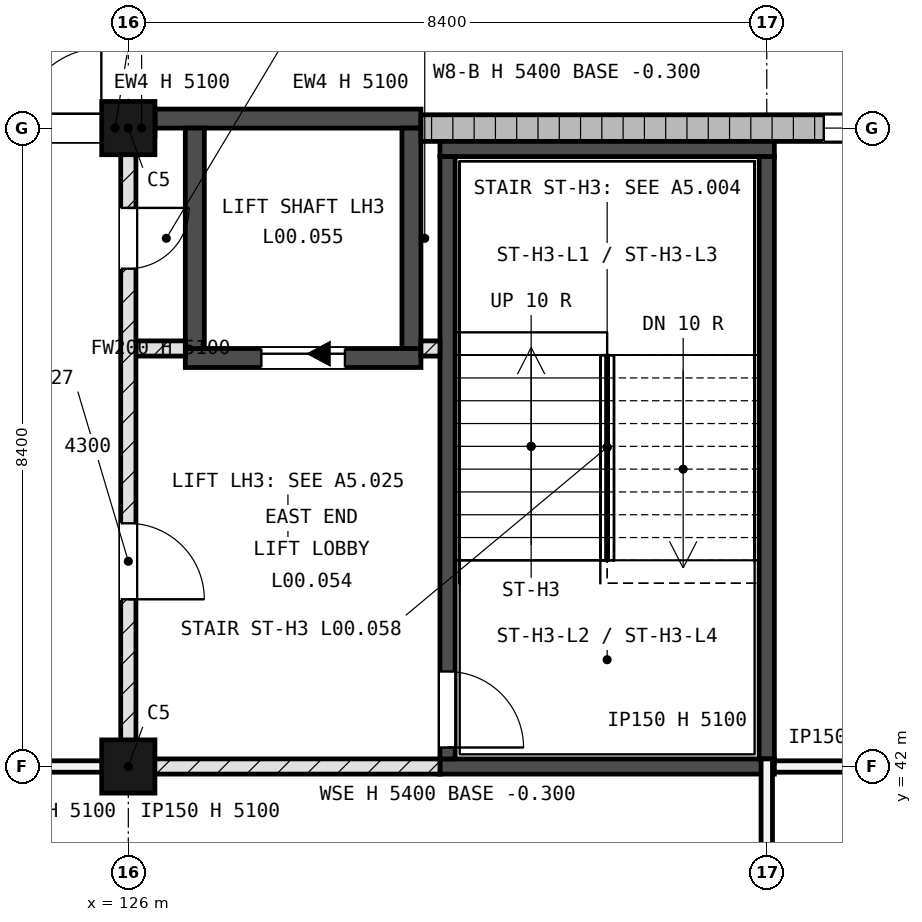
"""IFC4 building model, lengths in metres.
Left out: names, types, materials, properties, quantities, classifications, styles, units other than length and angle.
Written with IfcOpenShell. Run it as: python <this file> out.ifc"""

import sys

from ifc_helpers import new_model, si_unit, direction, frame, frame_2d, origin, origin_2d, place, context, subcontext, project, spatial, rectangle, extrude, element, fill, save


model = new_model("IFC4")
c1 = context("Model", 3, precision=1e-05, world=origin(), true_north=direction((0.0, 1.0)))
c2 = subcontext(c1, "Body", "Model", "MODEL_VIEW")
j1 = project(units=[si_unit("LENGTHUNIT", "METRE"), si_unit("PLANEANGLEUNIT", "RADIAN")], contexts=[c1])
p1 = place(None, origin())
s1 = spatial("IfcSite", under=j1, at=p1, CompositionType="ELEMENT")
p2 = place(p1, origin())
s2 = spatial("IfcBuilding", under=s1, at=p2, CompositionType="ELEMENT")
p3 = place(p2, origin())
s3 = spatial("IfcBuildingStorey", under=s2, at=p3, CompositionType="ELEMENT", Elevation=0.0)
for number, where, z_axis, x_axis in (
    (1, (126.0, 42.0, -0.3), (0.0, 0.0, 1.0), (1.0, 0.0, 0.0)),
    (2, (126.0, 50.4, -0.3), (0.0, 0.0, 1.0), (1.0, 0.0, 0.0)),
):
    element("IfcColumn", number, at=place(p3, frame(where, z_axis=z_axis, x_axis=x_axis)), inside=s3, PredefinedType="COLUMN", context=c2, shape_type="SweptSolid", body=[
        extrude(rectangle(XDim=0.7, YDim=0.7, at=origin_2d()), origin(), (0.0, 0.0, 1.0), 5.4),
    ])
p4 = place(p3, frame((126.75, 47.375, -0.3), z_axis=(0.0, 0.0, 1.0), x_axis=(1.0, 0.0, 0.0)))
e3 = element("IfcWall", 3, at=p4, inside=s3, PredefinedType="SHEAR", context=c2, shape_type="SweptSolid", body=[
    extrude(rectangle(XDim=3.1, YDim=0.25, at=frame_2d((1.55, 0.0))), origin(), (0.0, 0.0, 1.0), 5.4),
])
p5 = place(p4, frame((1.0, 0.0, 0.3)))
e4 = element("IfcOpeningElement", 4, at=p5, cuts=e3, PredefinedType="OPENING", context=c2, shape_type="SweptSolid", body=[
    extrude(rectangle(XDim=1.1, YDim=2.1, at=frame_2d((0.55, 1.05))), frame((0.0, 0.135, 0.0), z_axis=(0.0, -1.0, 0.0), x_axis=(1.0, 0.0, 0.0)), (0.0, 0.0, 1.0), 0.27),
])
p6 = place(p3, frame((126.35, 50.525, -0.3), z_axis=(0.0, 0.0, 1.0), x_axis=(1.0, 0.0, 0.0)))
e5 = element("IfcWall", 5, at=p6, inside=s3, PredefinedType="SHEAR", context=c2, shape_type="SweptSolid", body=[
    extrude(rectangle(XDim=3.5, YDim=0.25, at=frame_2d((1.75, 0.0))), origin(), (0.0, 0.0, 1.0), 5.4),
])
for number, where, z_axis, x_axis in (
    (6, (126.875, 47.5, -0.3), (0.0, 0.0, 1.0), (0.0, 1.0, 0.0)),
    (7, (129.725, 47.5, -0.3), (0.0, 0.0, 1.0), (0.0, 1.0, 0.0)),
):
    element("IfcWall", number, at=place(p3, frame(where, z_axis=z_axis, x_axis=x_axis)), inside=s3, PredefinedType="SHEAR", context=c2, shape_type="SweptSolid", body=[
        extrude(rectangle(XDim=2.9, YDim=0.25, at=frame_2d((1.45, 0.0))), origin(), (0.0, 0.0, 1.0), 5.4),
    ])
p7 = place(p3, frame((109.575, 50.4, 0.0), z_axis=(0.0, 0.0, 1.0), x_axis=(1.0, 0.0, 0.0)))
e8 = element("IfcWall", 8, at=p7, inside=s3, PredefinedType="STANDARD", context=c2, shape_type="SweptSolid", body=[
    extrude(rectangle(XDim=16.075, YDim=0.35, at=frame_2d((8.038, 0.0))), origin(), (0.0, 0.0, 1.0), 5.1),
])
p8 = place(p7, frame((8.375, 0.0, 0.0)))
e9 = element("IfcOpeningElement", 9, at=p8, cuts=e8, PredefinedType="OPENING", context=c2, shape_type="SweptSolid", body=[
    extrude(rectangle(XDim=2.1, YDim=2.2, at=frame_2d((1.05, 1.1))), frame((0.0, 0.185, 0.0), z_axis=(0.0, -1.0, 0.0), x_axis=(1.0, 0.0, 0.0)), (0.0, 0.0, 1.0), 0.37),
])
p9 = place(p7, frame((11.175, 0.0, 0.0)))
e10 = element("IfcOpeningElement", 10, at=p9, cuts=e8, PredefinedType="OPENING", context=c2, shape_type="SweptSolid", body=[
    extrude(rectangle(XDim=2.1, YDim=2.2, at=frame_2d((1.05, 1.1))), frame((0.0, 0.185, 0.0), z_axis=(0.0, -1.0, 0.0), x_axis=(1.0, 0.0, 0.0)), (0.0, 0.0, 1.0), 0.37),
])
p10 = place(p7, frame((13.97, 0.0, 0.0)))
e11 = element("IfcOpeningElement", 11, at=p10, cuts=e8, PredefinedType="OPENING", context=c2, shape_type="SweptSolid", body=[
    extrude(rectangle(XDim=2.1, YDim=2.2, at=frame_2d((1.05, 1.1))), frame((0.0, 0.185, 0.0), z_axis=(0.0, -1.0, 0.0), x_axis=(1.0, 0.0, 0.0)), (0.0, 0.0, 1.0), 0.37),
])
p11 = place(p7, frame((0.712, 0.0, 0.9)))
e12 = element("IfcOpeningElement", 12, at=p11, cuts=e8, PredefinedType="OPENING", context=c2, shape_type="SweptSolid", body=[
    extrude(rectangle(XDim=2.4, YDim=1.5, at=frame_2d((1.2, 0.75))), frame((0.0, 0.185, 0.0), z_axis=(0.0, -1.0, 0.0), x_axis=(1.0, 0.0, 0.0)), (0.0, 0.0, 1.0), 0.37),
])
p12 = place(p3, frame((129.85, 50.4, 0.0), z_axis=(0.0, 0.0, 1.0), x_axis=(1.0, 0.0, 0.0)))
e13 = element("IfcWall", 13, at=p12, inside=s3, PredefinedType="STANDARD", context=c2, shape_type="SweptSolid", body=[
    extrude(rectangle(XDim=12.6, YDim=0.35, at=frame_2d((6.3, 0.0))), origin(), (0.0, 0.0, 1.0), 5.1),
])
p13 = place(p12, frame((7.7, 0.0, 0.0)))
e14 = element("IfcOpeningElement", 14, at=p13, cuts=e13, PredefinedType="OPENING", context=c2, shape_type="SweptSolid", body=[
    extrude(rectangle(XDim=2.1, YDim=2.2, at=frame_2d((1.05, 1.1))), frame((0.0, 0.185, 0.0), z_axis=(0.0, -1.0, 0.0), x_axis=(1.0, 0.0, 0.0)), (0.0, 0.0, 1.0), 0.37),
])
p14 = place(p12, frame((5.3, 0.0, 0.6)))
e15 = element("IfcOpeningElement", 15, at=p14, cuts=e13, PredefinedType="OPENING", context=c2, shape_type="SweptSolid", body=[
    extrude(rectangle(XDim=1.2, YDim=1.8, at=frame_2d((0.6, 0.9))), frame((0.0, 0.185, 0.0), z_axis=(0.0, -1.0, 0.0), x_axis=(1.0, 0.0, 0.0)), (0.0, 0.0, 1.0), 0.37),
])
p15 = place(p12, frame((10.825, 0.0, 0.6)))
e16 = element("IfcOpeningElement", 16, at=p15, cuts=e13, PredefinedType="OPENING", context=c2, shape_type="SweptSolid", body=[
    extrude(rectangle(XDim=1.2, YDim=1.8, at=frame_2d((0.6, 0.9))), frame((0.0, 0.185, 0.0), z_axis=(0.0, -1.0, 0.0), x_axis=(1.0, 0.0, 0.0)), (0.0, 0.0, 1.0), 0.37),
])
for number, where, z_axis, x_axis in (
    (17, (130.1, 42.0, -0.3), (0.0, 0.0, 1.0), (1.0, 0.0, 0.0)),
    (18, (130.1, 50.125, -0.3), (0.0, 0.0, 1.0), (1.0, 0.0, 0.0)),
):
    element("IfcWall", number, at=place(p3, frame(where, z_axis=z_axis, x_axis=x_axis)), inside=s3, PredefinedType="SHEAR", context=c2, shape_type="SweptSolid", body=[
        extrude(rectangle(XDim=4.4, YDim=0.2, at=frame_2d((2.2, 0.0))), origin(), (0.0, 0.0, 1.0), 5.4),
    ])
p16 = place(p3, frame((130.2, 42.1, -0.3), z_axis=(0.0, 0.0, 1.0), x_axis=(0.0, 1.0, 0.0)))
e19 = element("IfcWall", 19, at=p16, inside=s3, PredefinedType="SHEAR", context=c2, shape_type="SweptSolid", body=[
    extrude(rectangle(XDim=7.925, YDim=0.2, at=frame_2d((3.962, 0.0))), origin(), (0.0, 0.0, 1.0), 5.4),
])
p17 = place(p16, frame((0.15, 0.0, 0.3)))
e20 = element("IfcOpeningElement", 20, at=p17, cuts=e19, PredefinedType="OPENING", context=c2, shape_type="SweptSolid", body=[
    extrude(rectangle(XDim=1.0, YDim=2.1, at=frame_2d((0.5, 1.05))), frame((0.0, 0.11, 0.0), z_axis=(0.0, -1.0, 0.0), x_axis=(1.0, 0.0, 0.0)), (0.0, 0.0, 1.0), 0.22),
])
p18 = place(p3, frame((134.4, 42.1, -0.3), z_axis=(0.0, 0.0, 1.0), x_axis=(0.0, 1.0, 0.0)))
e21 = element("IfcWall", 21, at=p18, inside=s3, PredefinedType="SHEAR", context=c2, shape_type="SweptSolid", body=[
    extrude(rectangle(XDim=7.925, YDim=0.2, at=frame_2d((3.962, 0.0))), origin(), (0.0, 0.0, 1.0), 5.4),
])
p19 = place(p3, frame((117.7, 42.0, 0.0), z_axis=(0.0, 0.0, 1.0), x_axis=(1.0, 0.0, 0.0)))
e22 = element("IfcWall", 22, at=p19, inside=s3, PredefinedType="PARTITIONING", context=c2, shape_type="SweptSolid", body=[
    extrude(rectangle(XDim=8.3, YDim=0.15, at=frame_2d((4.15, 0.0))), origin(), (0.0, 0.0, 1.0), 5.1),
])
p20 = place(p19, frame((3.05, 0.0, 0.0)))
e23 = element("IfcOpeningElement", 23, at=p20, cuts=e22, PredefinedType="OPENING", context=c2, shape_type="SweptSolid", body=[
    extrude(rectangle(XDim=2.1, YDim=2.1, at=frame_2d((1.05, 1.05))), frame((0.0, 0.085, 0.0), z_axis=(0.0, -1.0, 0.0), x_axis=(1.0, 0.0, 0.0)), (0.0, 0.0, 1.0), 0.17),
])
p21 = place(p3, frame((126.0, 42.0, 0.0), z_axis=(0.0, 0.0, 1.0), x_axis=(1.0, 0.0, 0.0)))
e24 = element("IfcWall", 24, at=p21, inside=s3, PredefinedType="SOLIDWALL", context=c2, shape_type="SweptSolid", body=[
    extrude(rectangle(XDim=4.1, YDim=0.2, at=frame_2d((2.05, 0.0))), origin(), (0.0, 0.0, 1.0), 5.1),
])
p22 = place(p3, frame((134.5, 42.0, 0.0), z_axis=(0.0, 0.0, 1.0), x_axis=(1.0, 0.0, 0.0)))
e25 = element("IfcWall", 25, at=p22, inside=s3, PredefinedType="PARTITIONING", context=c2, shape_type="SweptSolid", body=[
    extrude(rectangle(XDim=8.63, YDim=0.15, at=frame_2d((4.315, 0.0))), origin(), (0.0, 0.0, 1.0), 5.1),
])
p23 = place(p22, frame((3.65, 0.0, 0.0)))
e26 = element("IfcOpeningElement", 26, at=p23, cuts=e25, PredefinedType="OPENING", context=c2, shape_type="SweptSolid", body=[
    extrude(rectangle(XDim=0.9, YDim=2.25, at=frame_2d((0.45, 1.125))), frame((0.0, 0.085, 0.0), z_axis=(0.0, -1.0, 0.0), x_axis=(1.0, 0.0, 0.0)), (0.0, 0.0, 1.0), 0.17),
])
p24 = place(p3, frame((126.1, 47.5, 0.0), z_axis=(0.0, 0.0, 1.0), x_axis=(1.0, 0.0, 0.0)))
e27 = element("IfcWall", 27, at=p24, inside=s3, PredefinedType="SOLIDWALL", context=c2, shape_type="SweptSolid", body=[
    extrude(rectangle(XDim=0.65, YDim=0.2, at=frame_2d((0.325, 0.0))), origin(), (0.0, 0.0, 1.0), 5.1),
])
p25 = place(p3, frame((129.85, 47.5, 0.0), z_axis=(0.0, 0.0, 1.0), x_axis=(1.0, 0.0, 0.0)))
e28 = element("IfcWall", 28, at=p25, inside=s3, PredefinedType="SOLIDWALL", context=c2, shape_type="SweptSolid", body=[
    extrude(rectangle(XDim=0.25, YDim=0.2, at=frame_2d((0.125, 0.0))), origin(), (0.0, 0.0, 1.0), 5.1),
])
p26 = place(p3, frame((125.65, 50.4, 0.0), z_axis=(0.0, 0.0, 1.0), x_axis=(1.0, 0.0, 0.0)))
e29 = element("IfcWall", 29, at=p26, inside=s3, PredefinedType="PARTITIONING", context=c2, shape_type="SweptSolid", body=[
    extrude(rectangle(XDim=0.35, YDim=0.15, at=frame_2d((0.175, 0.0))), origin(), (0.0, 0.0, 1.0), 5.1),
])
p27 = place(p3, frame((126.0, 50.4, 0.0), z_axis=(0.0, 0.0, 1.0), x_axis=(1.0, 0.0, 0.0)))
e30 = element("IfcWall", 30, at=p27, inside=s3, PredefinedType="SOLIDWALL", context=c2, shape_type="SweptSolid", body=[
    extrude(rectangle(XDim=0.35, YDim=0.2, at=frame_2d((0.175, 0.0))), origin(), (0.0, 0.0, 1.0), 5.1),
])
p28 = place(p3, frame((126.0, 42.1, 0.0), z_axis=(0.0, 0.0, 1.0), x_axis=(0.0, 1.0, 0.0)))
e31 = element("IfcWall", 31, at=p28, inside=s3, PredefinedType="SOLIDWALL", context=c2, shape_type="SweptSolid", body=[
    extrude(rectangle(XDim=8.2, YDim=0.2, at=frame_2d((4.1, 0.0))), origin(), (0.0, 0.0, 1.0), 4.3),
])
p29 = place(p28, frame((6.45, 0.0, 0.0)))
e32 = element("IfcOpeningElement", 32, at=p29, cuts=e31, PredefinedType="OPENING", context=c2, shape_type="SweptSolid", body=[
    extrude(rectangle(XDim=0.8, YDim=2.1, at=frame_2d((0.4, 1.05))), frame((0.0, 0.11, 0.0), z_axis=(0.0, -1.0, 0.0), x_axis=(1.0, 0.0, 0.0)), (0.0, 0.0, 1.0), 0.22),
])
p30 = place(p28, frame((2.1, 0.0, 0.0)))
e33 = element("IfcOpeningElement", 33, at=p30, cuts=e31, PredefinedType="OPENING", context=c2, shape_type="SweptSolid", body=[
    extrude(rectangle(XDim=1.0, YDim=2.1, at=frame_2d((0.5, 1.05))), frame((0.0, 0.11, 0.0), z_axis=(0.0, -1.0, 0.0), x_axis=(1.0, 0.0, 0.0)), (0.0, 0.0, 1.0), 0.22),
])
p31 = place(p3, frame((134.4, 33.27, 0.0), z_axis=(0.0, 0.0, 1.0), x_axis=(0.0, 1.0, 0.0)))
e34 = element("IfcWall", 34, at=p31, inside=s3, PredefinedType="PARTITIONING", context=c2, shape_type="SweptSolid", body=[
    extrude(rectangle(XDim=8.83, YDim=0.15, at=frame_2d((4.415, 0.0))), origin(), (0.0, 0.0, 1.0), 5.1),
])
p32 = place(p10, origin())
e35 = element("IfcDoor", 35, at=p32, inside=s3, OperationType="SINGLE_SWING_LEFT", PredefinedType="DOOR", context=c2, shape_type="SweptSolid", body=[
    extrude(rectangle(XDim=2.1, YDim=0.013, at=frame_2d((1.05, 0.007))), frame((0.0, 0.115, 0.0), z_axis=(0.0, -1.0, 0.0), x_axis=(1.0, 0.0, 0.0)), (0.0, 0.0, 1.0), 0.23),
    extrude(rectangle(XDim=0.075, YDim=2.112, at=frame_2d((0.038, 1.069))), frame((0.0, 0.125, 0.0), z_axis=(0.0, -1.0, 0.0), x_axis=(1.0, 0.0, 0.0)), (0.0, 0.0, 1.0), 0.25),
    extrude(rectangle(XDim=0.075, YDim=2.112, at=frame_2d((2.062, 1.069))), frame((0.0, 0.125, 0.0), z_axis=(0.0, -1.0, 0.0), x_axis=(1.0, 0.0, 0.0)), (0.0, 0.0, 1.0), 0.25),
    extrude(rectangle(XDim=2.1, YDim=0.075, at=frame_2d((1.05, 2.163))), frame((0.0, 0.115, 0.0), z_axis=(0.0, -1.0, 0.0), x_axis=(1.0, 0.0, 0.0)), (0.0, 0.0, 1.0), 0.23),
    extrude(rectangle(XDim=1.95, YDim=0.3, at=frame_2d((1.05, 0.163))), frame((0.0, 0.02, 0.0), z_axis=(0.0, -1.0, 0.0), x_axis=(1.0, 0.0, 0.0)), (0.0, 0.0, 1.0), 0.04),
    extrude(rectangle(XDim=1.95, YDim=0.12, at=frame_2d((1.05, 2.065))), frame((0.0, 0.02, 0.0), z_axis=(0.0, -1.0, 0.0), x_axis=(1.0, 0.0, 0.0)), (0.0, 0.0, 1.0), 0.04),
    extrude(rectangle(XDim=0.09, YDim=1.692, at=frame_2d((0.12, 1.159))), frame((0.0, 0.025, 0.0), z_axis=(0.0, -1.0, 0.0), x_axis=(1.0, 0.0, 0.0)), (0.0, 0.0, 1.0), 0.05),
    extrude(rectangle(XDim=0.18, YDim=1.692, at=frame_2d((1.05, 1.159))), frame((0.0, 0.025, 0.0), z_axis=(0.0, -1.0, 0.0), x_axis=(1.0, 0.0, 0.0)), (0.0, 0.0, 1.0), 0.05),
    extrude(rectangle(XDim=0.09, YDim=1.692, at=frame_2d((1.98, 1.159))), frame((0.0, 0.025, 0.0), z_axis=(0.0, -1.0, 0.0), x_axis=(1.0, 0.0, 0.0)), (0.0, 0.0, 1.0), 0.05),
    extrude(rectangle(XDim=0.795, YDim=1.692, at=frame_2d((0.562, 1.159))), frame((0.0, 0.012, 0.0), z_axis=(0.0, -1.0, 0.0), x_axis=(1.0, 0.0, 0.0)), (0.0, 0.0, 1.0), 0.024),
    extrude(rectangle(XDim=0.795, YDim=1.692, at=frame_2d((1.538, 1.159))), frame((0.0, 0.012, 0.0), z_axis=(0.0, -1.0, 0.0), x_axis=(1.0, 0.0, 0.0)), (0.0, 0.0, 1.0), 0.024),
])
fill(e11, e35)
p33 = place(p14, origin())
e36 = element("IfcWindow", 36, at=p33, inside=s3, PartitioningType="SINGLE_PANEL", PredefinedType="WINDOW", context=c2, shape_type="SweptSolid", body=[
    extrude(rectangle(XDim=1.2, YDim=1.8, at=frame_2d((0.6, 0.9))), frame((0.0, 0.03, 0.0), z_axis=(0.0, -1.0, 0.0), x_axis=(1.0, 0.0, 0.0)), (0.0, 0.0, 1.0), 0.06),
])
fill(e15, e36)
p34 = place(p5, origin())
e37 = element("IfcDoor", 37, at=p34, inside=s3, OperationType="SLIDING_TO_LEFT", PredefinedType="DOOR", context=c2, shape_type="SweptSolid", body=[
    extrude(rectangle(XDim=1.1, YDim=2.1, at=frame_2d((0.55, 1.05))), frame((0.0, 0.025, 0.0), z_axis=(0.0, -1.0, 0.0), x_axis=(1.0, 0.0, 0.0)), (0.0, 0.0, 1.0), 0.05),
])
fill(e4, e37)
p35 = place(p17, origin())
e38 = element("IfcDoor", 38, at=p35, inside=s3, OperationType="SINGLE_SWING_LEFT", PredefinedType="DOOR", context=c2, shape_type="SweptSolid", body=[
    extrude(rectangle(XDim=1.0, YDim=2.1, at=frame_2d((0.5, 1.05))), frame((0.0, 0.025, 0.0), z_axis=(0.0, -1.0, 0.0), x_axis=(1.0, 0.0, 0.0)), (0.0, 0.0, 1.0), 0.05),
])
fill(e20, e38)
p36 = place(p29, origin())
e39 = element("IfcDoor", 39, at=p36, inside=s3, OperationType="SINGLE_SWING_RIGHT", PredefinedType="DOOR", context=c2, shape_type="SweptSolid", body=[
    extrude(rectangle(XDim=0.8, YDim=2.1, at=frame_2d((0.4, 1.05))), frame((0.0, 0.025, 0.0), z_axis=(0.0, -1.0, 0.0), x_axis=(1.0, 0.0, 0.0)), (0.0, 0.0, 1.0), 0.05),
])
fill(e32, e39)
p37 = place(p30, origin())
e40 = element("IfcDoor", 40, at=p37, inside=s3, OperationType="SINGLE_SWING_LEFT", PredefinedType="DOOR", context=c2, shape_type="SweptSolid", body=[
    extrude(rectangle(XDim=1.0, YDim=2.1, at=frame_2d((0.5, 1.05))), frame((0.0, 0.025, 0.0), z_axis=(0.0, -1.0, 0.0), x_axis=(1.0, 0.0, 0.0)), (0.0, 0.0, 1.0), 0.05),
])
fill(e33, e40)
save(model, sys.argv[1])
